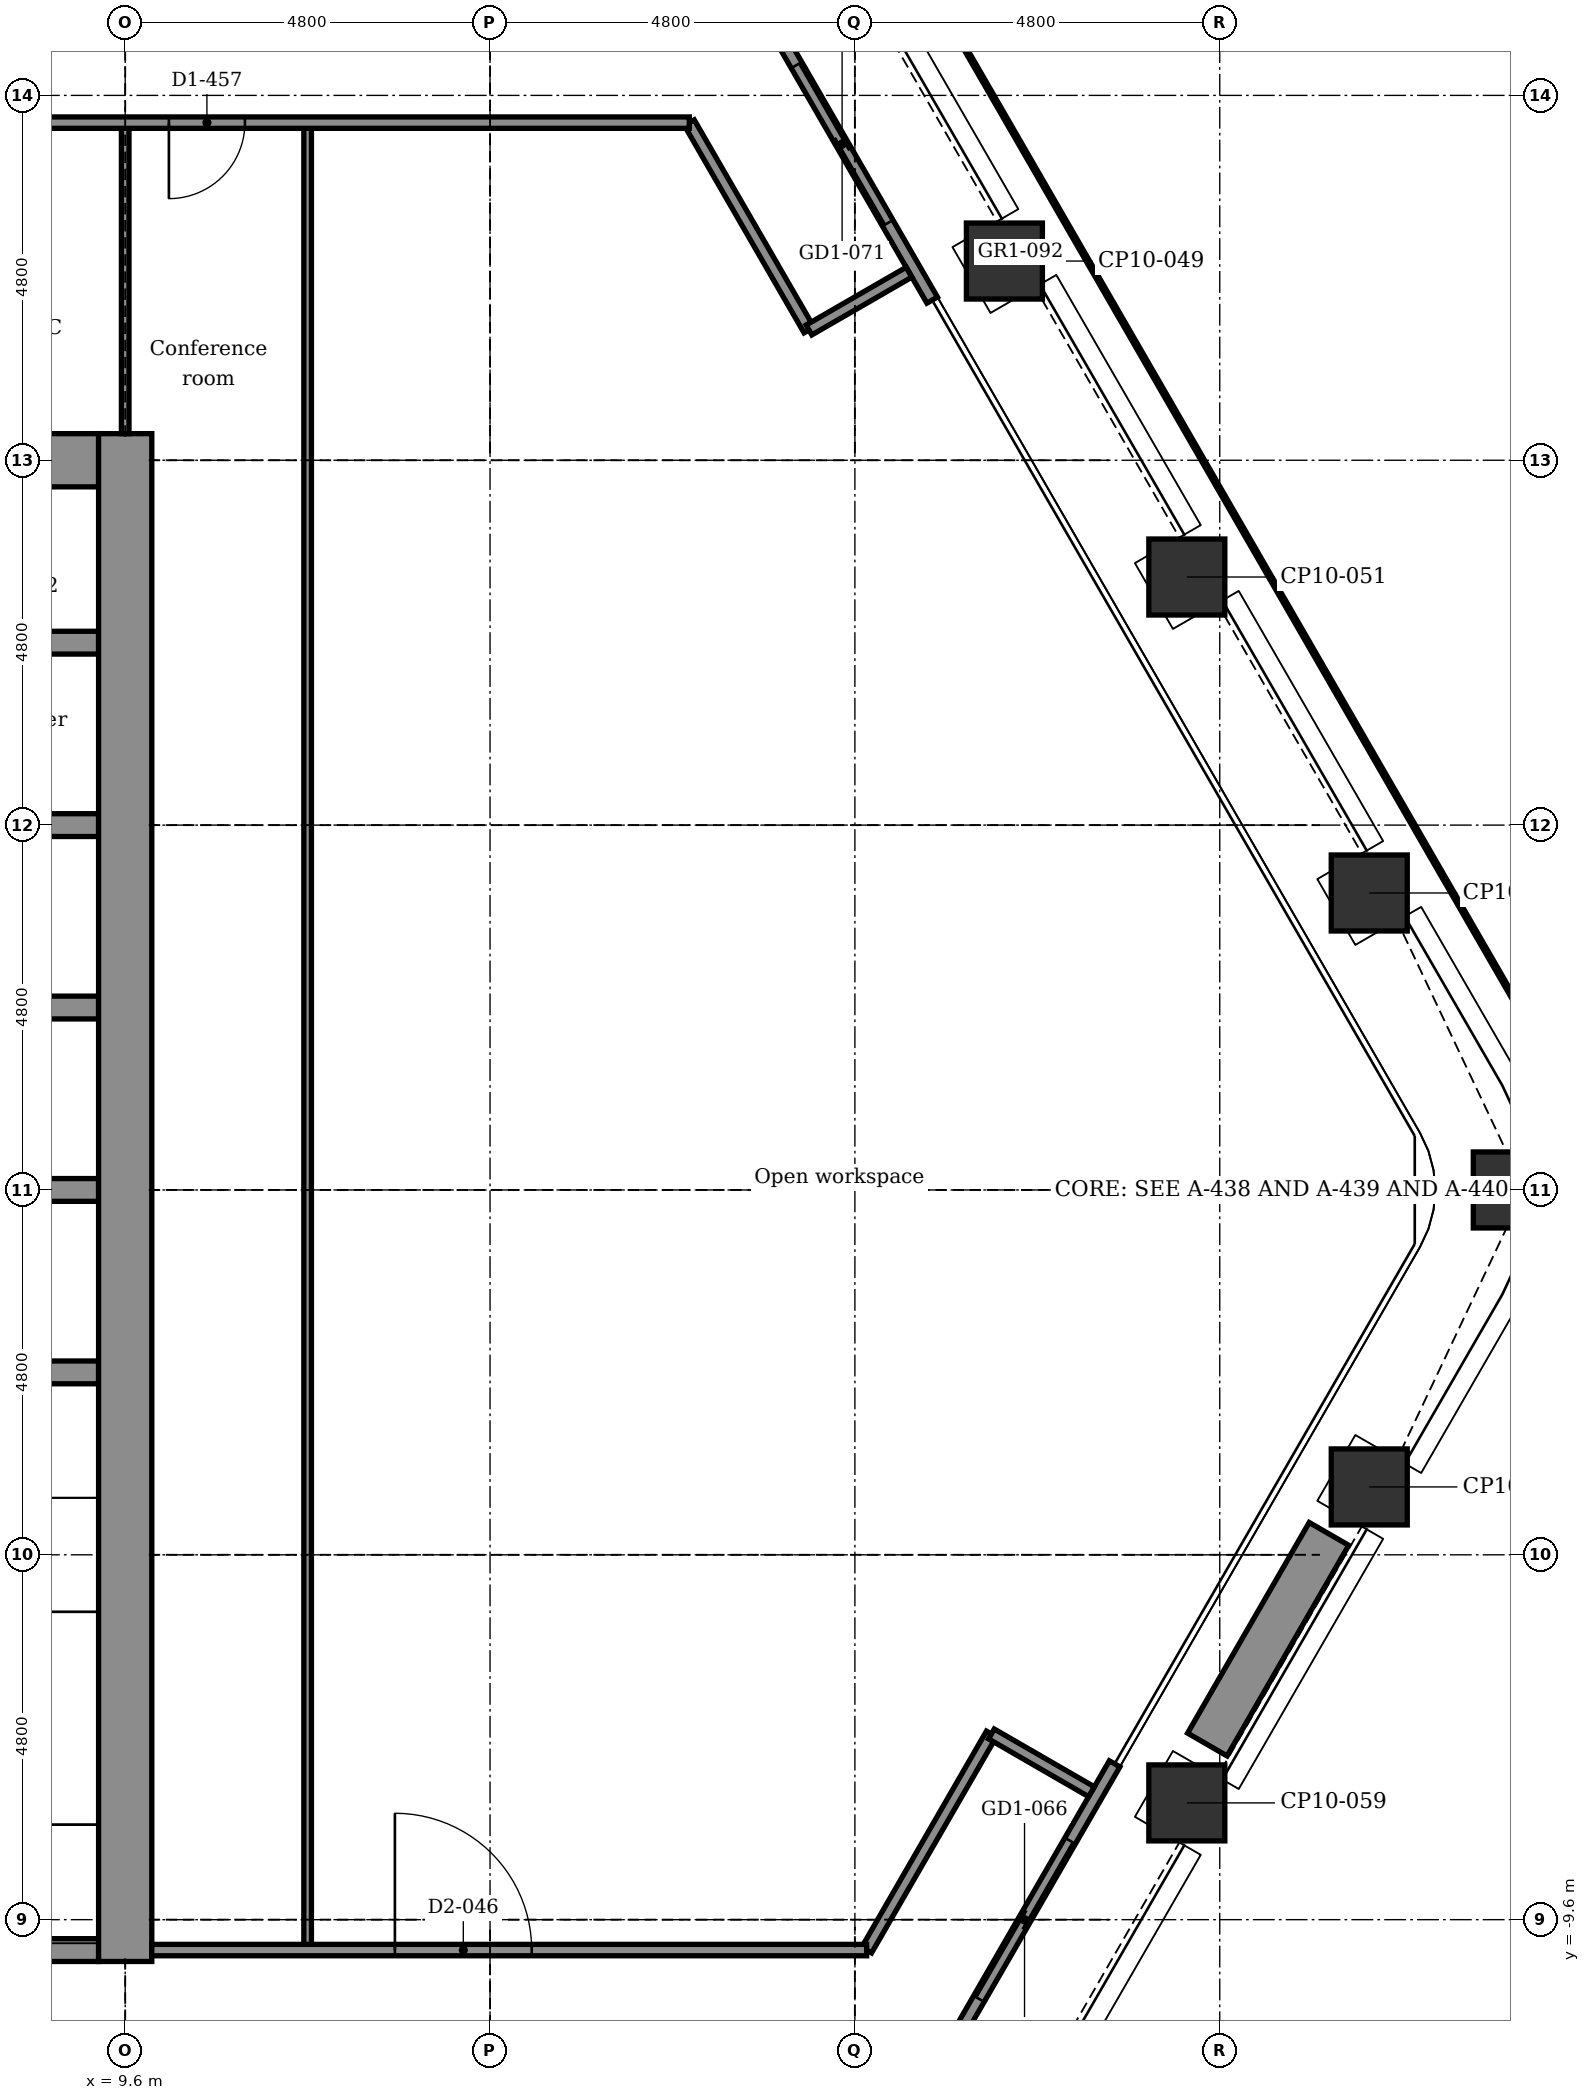
"""IFC4 building model, lengths in metres.
Left out: names, types, materials, properties, quantities, classifications, styles, units other than length and angle.
Written with IfcOpenShell. Run it as: python <this file> out.ifc"""

import sys

from ifc_helpers import new_model, si_unit, direction, frame, frame_2d, origin, origin_2d, place, context, subcontext, project, spatial, rectangle, extrude, element, fill, save


model = new_model("IFC4")
c1 = context("Model", 3, precision=1e-05, world=origin(), true_north=direction((0.0, 1.0)))
c2 = subcontext(c1, "Body", "Model", "MODEL_VIEW")
j1 = project(units=[si_unit("LENGTHUNIT", "METRE"), si_unit("PLANEANGLEUNIT", "RADIAN")], contexts=[c1])
p1 = place(None, origin())
s1 = spatial("IfcSite", under=j1, at=p1, CompositionType="ELEMENT")
p2 = place(p1, origin())
s2 = spatial("IfcBuilding", under=s1, at=p2, CompositionType="ELEMENT")
p3 = place(p2, frame((0.0, 0.0, 154.4)))
s3 = spatial("IfcBuildingStorey", under=s2, at=p3, CompositionType="ELEMENT", Elevation=154.4)
for number, where, z_axis, x_axis in (
    (1, (21.167, 12.221, -0.15), (0.0, 0.0, 1.0), (0.866, 0.5, 0.0)),
    (2, (23.567, 8.064, -0.15), (0.0, 0.0, 1.0), (0.866, 0.5, 0.0)),
    (3, (25.967, 3.907, -0.15), (0.0, 0.0, 1.0), (0.866, 0.5, 0.0)),
    (4, (27.836, 0.0, -0.15), (0.0, 0.0, 1.0), (1.0, 0.0, 0.0)),
    (5, (25.967, -3.907, -0.15), (0.0, 0.0, 1.0), (0.5, 0.866, 0.0)),
    (6, (23.567, -8.064, -0.15), (0.0, 0.0, 1.0), (0.5, 0.866, 0.0)),
):
    element("IfcColumn", number, at=place(p3, frame(where, z_axis=z_axis, x_axis=x_axis)), inside=s3, PredefinedType="COLUMN", context=c2, shape_type="SweptSolid", body=[
        extrude(rectangle(XDim=1.0, YDim=1.0, at=origin_2d()), origin(), (0.0, 0.0, 1.0), 3.9),
    ])
p4 = place(p3, frame((4.95, -10.0, -0.15), z_axis=(0.0, 0.0, 1.0), x_axis=(1.0, 0.0, 0.0)))
e7 = element("IfcWall", 7, at=p4, inside=s3, PredefinedType="STANDARD", context=c2, shape_type="SweptSolid", body=[
    extrude(rectangle(XDim=4.3, YDim=0.3, at=frame_2d((2.15, 0.0))), origin(), (0.0, 0.0, 1.0), 3.9),
])
for number, where, z_axis, x_axis in (
    (8, (6.15, -2.4, -0.15), (0.0, 0.0, 1.0), (1.0, 0.0, 0.0)),
    (9, (6.15, 0.0, -0.15), (0.0, 0.0, 1.0), (1.0, 0.0, 0.0)),
    (10, (6.15, 2.4, -0.15), (0.0, 0.0, 1.0), (1.0, 0.0, 0.0)),
    (11, (6.15, 4.8, -0.15), (0.0, 0.0, 1.0), (1.0, 0.0, 0.0)),
):
    element("IfcWall", number, at=place(p3, frame(where, z_axis=z_axis, x_axis=x_axis)), inside=s3, PredefinedType="STANDARD", context=c2, shape_type="SweptSolid", body=[
        extrude(rectangle(XDim=3.1, YDim=0.3, at=frame_2d((1.55, 0.0))), origin(), (0.0, 0.0, 1.0), 3.9),
    ])
p5 = place(p3, frame((6.0, 7.2, -0.15), z_axis=(0.0, 0.0, 1.0), x_axis=(1.0, 0.0, 0.0)))
e12 = element("IfcWall", 12, at=p5, inside=s3, PredefinedType="STANDARD", context=c2, shape_type="SweptSolid", body=[
    extrude(rectangle(XDim=3.25, YDim=0.3, at=frame_2d((1.625, 0.0))), origin(), (0.0, 0.0, 1.0), 3.9),
])
p6 = place(p3, frame((-5.25, 9.6, -0.15), z_axis=(0.0, 0.0, 1.0), x_axis=(1.0, 0.0, 0.0)))
e13 = element("IfcWall", 13, at=p6, inside=s3, PredefinedType="SHEAR", context=c2, shape_type="SweptSolid", body=[
    extrude(rectangle(XDim=14.5, YDim=0.7, at=frame_2d((7.25, 0.0))), origin(), (0.0, 0.0, 1.0), 3.9),
])
p7 = place(p6, frame((9.35, 0.0, 0.15)))
e14 = element("IfcOpeningElement", 14, at=p7, cuts=e13, PredefinedType="OPENING", context=c2, shape_type="SweptSolid", body=[
    extrude(rectangle(XDim=1.4, YDim=2.1, at=frame_2d((0.7, 1.05))), frame((0.0, 0.36, 0.0), z_axis=(0.0, -1.0, 0.0), x_axis=(1.0, 0.0, 0.0)), (0.0, 0.0, 1.0), 0.72),
])
p8 = place(p3, frame((9.6, -10.15, -0.15), z_axis=(0.0, 0.0, 1.0), x_axis=(0.0, 1.0, 0.0)))
e15 = element("IfcWall", 15, at=p8, inside=s3, PredefinedType="SHEAR", context=c2, shape_type="SweptSolid", body=[
    extrude(rectangle(XDim=20.1, YDim=0.7, at=frame_2d((10.05, 0.0))), origin(), (0.0, 0.0, 1.0), 3.9),
])
p9 = place(p3, frame((17.847, 15.812, 0.0), z_axis=(0.0, 0.0, 1.0), x_axis=(0.5000167099, -0.866015756104, 0.0)))
e16 = element("IfcWall", 16, at=p9, inside=s3, PredefinedType="PARTITIONING", context=c2, shape_type="SweptSolid", body=[
    extrude(rectangle(XDim=4.74, YDim=0.16, at=frame_2d((2.37, 0.0))), origin(), (0.0, 0.0, 1.0), 3.75),
])
p10 = place(p9, frame((1.17, 0.0, 0.0)))
e17 = element("IfcOpeningElement", 17, at=p10, cuts=e16, PredefinedType="OPENING", context=c2, shape_type="SweptSolid", body=[
    extrude(rectangle(XDim=2.4, YDim=2.4, at=frame_2d((1.2, 1.2))), frame((0.0, 0.09, 0.0), z_axis=(0.0, -1.0, 0.0), x_axis=(1.0, 0.0, 0.0)), (0.0, 0.0, 1.0), 0.18),
])
p11 = place(p3, frame((22.617, -7.55, 0.0), z_axis=(0.0, 0.0, 1.0), x_axis=(-0.5000167099, -0.866015756104, 0.0)))
e18 = element("IfcWall", 18, at=p11, inside=s3, PredefinedType="PARTITIONING", context=c2, shape_type="SweptSolid", body=[
    extrude(rectangle(XDim=4.74, YDim=0.16, at=frame_2d((2.37, 0.0))), origin(), (0.0, 0.0, 1.0), 3.75),
])
p12 = place(p11, frame((1.17, 0.0, 0.0)))
e19 = element("IfcOpeningElement", 19, at=p12, cuts=e18, PredefinedType="OPENING", context=c2, shape_type="SweptSolid", body=[
    extrude(rectangle(XDim=2.4, YDim=2.4, at=frame_2d((1.2, 1.2))), frame((0.0, 0.09, 0.0), z_axis=(0.0, -1.0, 0.0), x_axis=(1.0, 0.0, 0.0)), (0.0, 0.0, 1.0), 0.18),
])
p13 = place(p3, frame((25.437, -4.525, 0.0), z_axis=(0.0, 0.0, 1.0), x_axis=(-0.499938187974, -0.866061088033, 0.0)))
e20 = element("IfcWall", 20, at=p13, inside=s3, PredefinedType="USERDEFINED", context=c2, shape_type="SweptSolid", body=[
    extrude(rectangle(XDim=3.2, YDim=0.6, at=frame_2d((1.6, 0.0))), origin(), (0.0, 0.0, 1.0), 0.7),
])
p14 = place(p3, frame((12.0, -10.0, 0.0), z_axis=(0.0, 0.0, 1.0), x_axis=(0.0, 1.0, 0.0)))
e21 = element("IfcWall", 21, at=p14, inside=s3, PredefinedType="PARTITIONING", context=c2, shape_type="SweptSolid", body=[
    extrude(rectangle(XDim=24.042, YDim=0.1, at=frame_2d((12.021, 0.0))), origin(), (0.0, 0.0, 1.0), 3.75),
])
p15 = place(p3, frame((9.6, 9.95, 0.0), z_axis=(0.0, 0.0, 1.0), x_axis=(0.0, 1.0, 0.0)))
e22 = element("IfcWall", 22, at=p15, inside=s3, PredefinedType="PARTITIONING", context=c2, shape_type="SweptSolid", body=[
    extrude(rectangle(XDim=4.092, YDim=0.1, at=frame_2d((2.046, 0.0))), origin(), (0.0, 0.0, 1.0), 3.066),
])
p16 = place(p3, frame((17.021, 14.042, 0.0), z_axis=(0.0, 0.0, 1.0), x_axis=(0.499957296199, -0.866050057432, 0.0)))
e23 = element("IfcWall", 23, at=p16, inside=s3, PredefinedType="PARTITIONING", context=c2, shape_type="SweptSolid", body=[
    extrude(rectangle(XDim=3.15, YDim=0.15, at=frame_2d((1.575, 0.0))), origin(), (0.0, 0.0, 1.0), 3.75),
])
p17 = place(p3, frame((19.354, -10.0, 0.0), z_axis=(0.0, 0.0, 1.0), x_axis=(0.500009969958, 0.86601964755, 0.0)))
e24 = element("IfcWall", 24, at=p17, inside=s3, PredefinedType="PARTITIONING", context=c2, shape_type="SweptSolid", body=[
    extrude(rectangle(XDim=3.283, YDim=0.15, at=frame_2d((1.642, 0.0))), origin(), (0.0, 0.0, 1.0), 3.75),
])
p18 = place(p3, frame((20.996, -7.157, 0.0), z_axis=(0.0, 0.0, 1.0), x_axis=(0.865960906633, -0.500111695708, 0.0)))
e25 = element("IfcWall", 25, at=p18, inside=s3, PredefinedType="PARTITIONING", context=c2, shape_type="SweptSolid", body=[
    extrude(rectangle(XDim=1.52, YDim=0.15, at=frame_2d((0.76, 0.0))), origin(), (0.0, 0.0, 1.0), 3.75),
])
p19 = place(p3, frame((18.596, 11.314, 0.0), z_axis=(0.0, 0.0, 1.0), x_axis=(0.866030456496, 0.499991248344, 0.0)))
e26 = element("IfcWall", 26, at=p19, inside=s3, PredefinedType="PARTITIONING", context=c2, shape_type="SweptSolid", body=[
    extrude(rectangle(XDim=1.52, YDim=0.15, at=frame_2d((0.76, 0.0))), origin(), (0.0, 0.0, 1.0), 3.75),
])
p20 = place(p3, frame((9.95, -10.0, 0.0), z_axis=(0.0, 0.0, 1.0), x_axis=(1.0, 0.0, 0.0)))
e27 = element("IfcWall", 27, at=p20, inside=s3, PredefinedType="PARTITIONING", context=c2, shape_type="SweptSolid", body=[
    extrude(rectangle(XDim=9.405, YDim=0.15, at=frame_2d((4.702, 0.0))), origin(), (0.0, 0.0, 1.0), 3.75),
])
p21 = place(p20, frame((3.198, 0.0, 0.0)))
e28 = element("IfcOpeningElement", 28, at=p21, cuts=e27, PredefinedType="OPENING", context=c2, shape_type="SweptSolid", body=[
    extrude(rectangle(XDim=1.8, YDim=2.1, at=frame_2d((0.9, 1.05))), frame((0.0, 0.085, 0.0), z_axis=(0.0, -1.0, 0.0), x_axis=(1.0, 0.0, 0.0)), (0.0, 0.0, 1.0), 0.17),
])
p22 = place(p3, frame((6.0, 14.042, 0.0), z_axis=(0.0, 0.0, 1.0), x_axis=(1.0, 0.0, 0.0)))
e29 = element("IfcWall", 29, at=p22, inside=s3, PredefinedType="PARTITIONING", context=c2, shape_type="SweptSolid", body=[
    extrude(rectangle(XDim=11.021, YDim=0.15, at=frame_2d((5.511, 0.0))), origin(), (0.0, 0.0, 1.0), 3.75),
])
p23 = place(p22, frame((4.175, 0.0, 0.0)))
e30 = element("IfcOpeningElement", 30, at=p23, cuts=e29, PredefinedType="OPENING", context=c2, shape_type="SweptSolid", body=[
    extrude(rectangle(XDim=1.0, YDim=2.1, at=frame_2d((0.5, 1.05))), frame((0.0, 0.085, 0.0), z_axis=(0.0, -1.0, 0.0), x_axis=(1.0, 0.0, 0.0)), (0.0, 0.0, 1.0), 0.17),
])
p24 = place(p10, origin())
e31 = element("IfcDoor", 31, at=p24, inside=s3, OperationType="DOUBLE_DOOR_SLIDING", PredefinedType="DOOR", context=c2, shape_type="SweptSolid", body=[
    extrude(rectangle(XDim=2.4, YDim=2.4, at=frame_2d((1.2, 1.2))), frame((0.0, 0.025, 0.0), z_axis=(0.0, -1.0, 0.0), x_axis=(1.0, 0.0, 0.0)), (0.0, 0.0, 1.0), 0.05),
])
fill(e17, e31)
p25 = place(p12, origin())
e32 = element("IfcDoor", 32, at=p25, inside=s3, OperationType="DOUBLE_DOOR_SLIDING", PredefinedType="DOOR", context=c2, shape_type="SweptSolid", body=[
    extrude(rectangle(XDim=2.4, YDim=2.4, at=frame_2d((1.2, 1.2))), frame((0.0, 0.025, 0.0), z_axis=(0.0, -1.0, 0.0), x_axis=(1.0, 0.0, 0.0)), (0.0, 0.0, 1.0), 0.05),
])
fill(e19, e32)
p26 = place(p23, frame((1.0, 0.0, 0.0), z_axis=(0.0, 0.0, 1.0), x_axis=(-1.0, 0.0, 0.0)))
e33 = element("IfcDoor", 33, at=p26, inside=s3, OperationType="SINGLE_SWING_LEFT", PredefinedType="DOOR", context=c2, shape_type="SweptSolid", body=[
    extrude(rectangle(XDim=1.0, YDim=2.1, at=frame_2d((0.5, 1.05))), frame((0.0, 0.025, 0.0), z_axis=(0.0, -1.0, 0.0), x_axis=(1.0, 0.0, 0.0)), (0.0, 0.0, 1.0), 0.05),
])
fill(e30, e33)
p27 = place(p21, origin())
e34 = element("IfcDoor", 34, at=p27, inside=s3, OperationType="SINGLE_SWING_LEFT", PredefinedType="DOOR", context=c2, shape_type="SweptSolid", body=[
    extrude(rectangle(XDim=1.8, YDim=2.1, at=frame_2d((0.9, 1.05))), frame((0.0, 0.025, 0.0), z_axis=(0.0, -1.0, 0.0), x_axis=(1.0, 0.0, 0.0)), (0.0, 0.0, 1.0), 0.05),
])
fill(e28, e34)
save(model, sys.argv[1])
